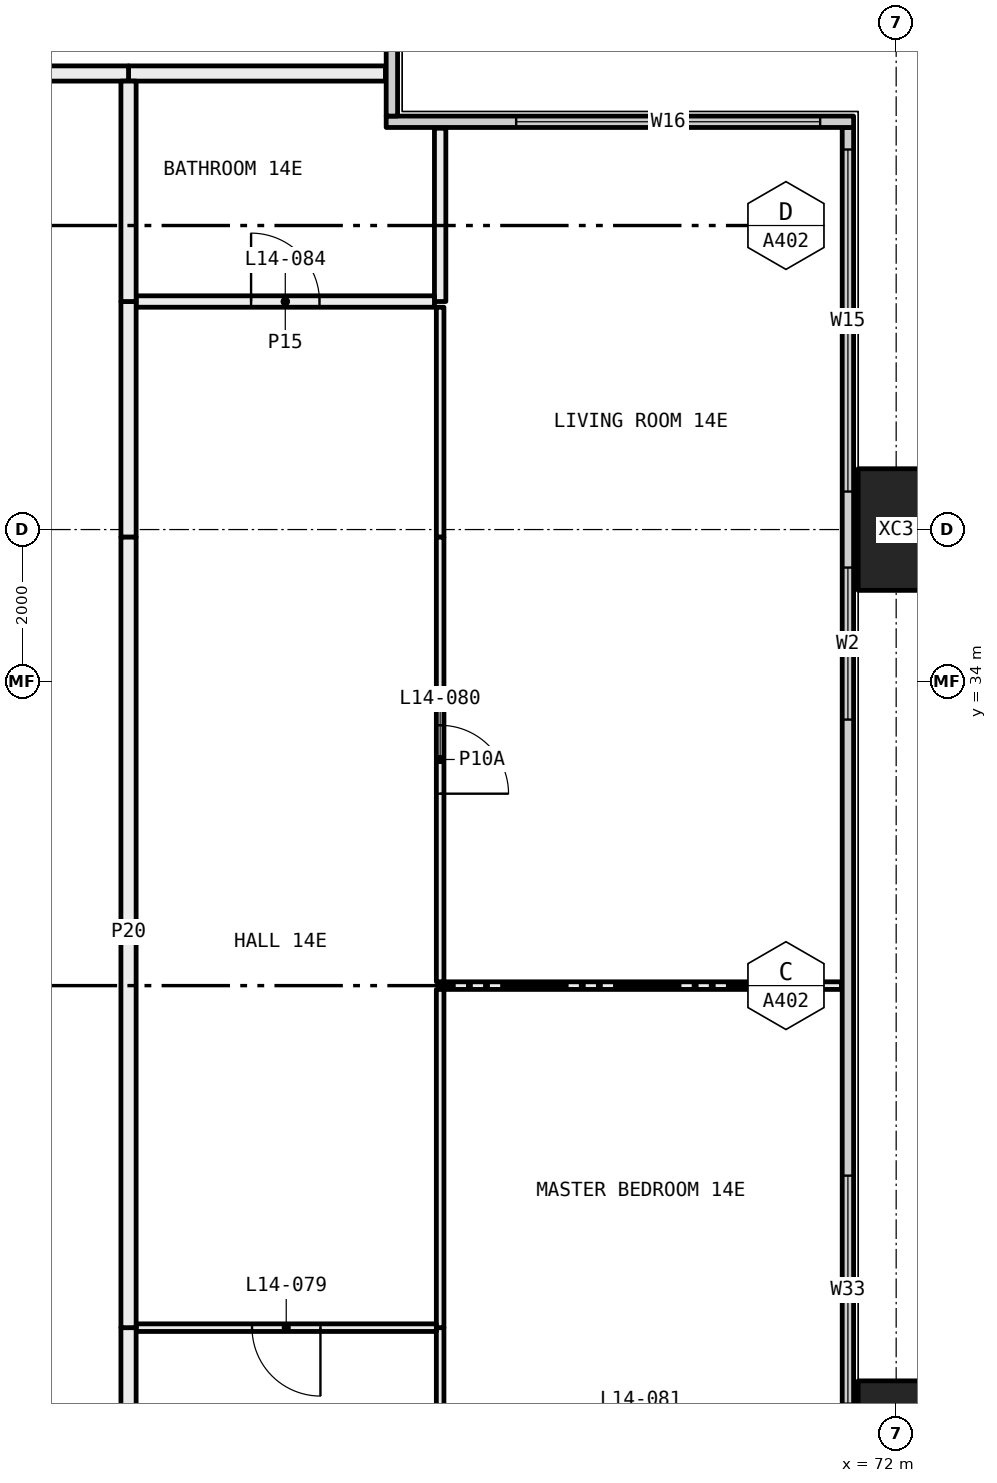
"""IFC4 building model, lengths in metres.
Left out: names, types, materials, properties, quantities, classifications, styles, units other than length and angle.
Written with IfcOpenShell. Run it as: python <this file> out.ifc"""

import sys

from ifc_helpers import new_model, si_unit, direction, frame, frame_2d, origin, origin_2d, place, context, subcontext, project, spatial, rectangle, hollow_rectangle, extrude, element, fill, save


model = new_model("IFC4")
c1 = context("Model", 3, precision=1e-05, world=origin(), true_north=direction((0.0, 1.0)))
c2 = subcontext(c1, "Body", "Model", "MODEL_VIEW")
j1 = project(units=[si_unit("LENGTHUNIT", "METRE"), si_unit("PLANEANGLEUNIT", "RADIAN")], contexts=[c1])
p1 = place(None, origin())
s1 = spatial("IfcSite", under=j1, at=p1, CompositionType="ELEMENT")
p2 = place(p1, origin())
s2 = spatial("IfcBuilding", under=s1, at=p2, CompositionType="ELEMENT")
p3 = place(p2, frame((0.0, 0.0, 61.05)))
s3 = spatial("IfcBuildingStorey", under=s2, at=p3, CompositionType="ELEMENT", Elevation=61.05)
for number, where, z_axis, x_axis in (
    (1, (72.0, 24.0, -0.4), (0.0, 0.0, 1.0), (0.0, 1.0, 0.0)),
    (2, (72.0, 36.0, -0.4), (0.0, 0.0, 1.0), (0.0, 1.0, 0.0)),
):
    element("IfcColumn", number, at=place(p3, frame(where, z_axis=z_axis, x_axis=x_axis)), inside=s3, PredefinedType="COLUMN", context=c2, shape_type="SweptSolid", body=[
        extrude(hollow_rectangle(XDim=1.6, YDim=1.0, WallThickness=0.065, at=origin_2d()), origin(), (0.0, 0.0, 1.0), 3.45),
    ])
p4 = place(p3, frame((71.365, 6.71, 0.0), z_axis=(0.0, 0.0, 1.0), x_axis=(0.0, 1.0, 0.0)))
e3 = element("IfcWall", 3, at=p4, inside=s3, PredefinedType="ELEMENTEDWALL", context=c2, shape_type="SweptSolid", body=[
    extrude(rectangle(XDim=34.58, YDim=0.15, at=frame_2d((17.29, 0.0))), origin(), (0.0, 0.0, 1.0), 3.05),
])
p5 = place(p4, frame((0.29, 0.0, 0.45)))
e4 = element("IfcOpeningElement", 4, at=p5, cuts=e3, PredefinedType="OPENING", context=c2, shape_type="SweptSolid", body=[
    extrude(rectangle(XDim=4.5, YDim=2.55, at=frame_2d((2.25, 1.275))), frame((0.0, 0.085, 0.0), z_axis=(0.0, -1.0, 0.0), x_axis=(1.0, 0.0, 0.0)), (0.0, 0.0, 1.0), 0.17),
])
p6 = place(p4, frame((5.79, 0.0, 0.45)))
e5 = element("IfcOpeningElement", 5, at=p6, cuts=e3, PredefinedType="OPENING", context=c2, shape_type="SweptSolid", body=[
    extrude(rectangle(XDim=3.0, YDim=2.55, at=frame_2d((1.5, 1.275))), frame((0.0, 0.085, 0.0), z_axis=(0.0, -1.0, 0.0), x_axis=(1.0, 0.0, 0.0)), (0.0, 0.0, 1.0), 0.17),
])
p7 = place(p4, frame((13.79, 0.0, 0.45)))
e6 = element("IfcOpeningElement", 6, at=p7, cuts=e3, PredefinedType="OPENING", context=c2, shape_type="SweptSolid", body=[
    extrude(rectangle(XDim=3.0, YDim=2.55, at=frame_2d((1.5, 1.275))), frame((0.0, 0.085, 0.0), z_axis=(0.0, -1.0, 0.0), x_axis=(1.0, 0.0, 0.0)), (0.0, 0.0, 1.0), 0.17),
])
p8 = place(p4, frame((17.79, 0.0, 0.45)))
e7 = element("IfcOpeningElement", 7, at=p8, cuts=e3, PredefinedType="OPENING", context=c2, shape_type="SweptSolid", body=[
    extrude(rectangle(XDim=3.0, YDim=2.55, at=frame_2d((1.5, 1.275))), frame((0.0, 0.085, 0.0), z_axis=(0.0, -1.0, 0.0), x_axis=(1.0, 0.0, 0.0)), (0.0, 0.0, 1.0), 0.17),
])
p9 = place(p4, frame((26.79, 0.0, 0.45)))
e8 = element("IfcOpeningElement", 8, at=p9, cuts=e3, PredefinedType="OPENING", context=c2, shape_type="SweptSolid", body=[
    extrude(rectangle(XDim=2.0, YDim=2.55, at=frame_2d((1.0, 1.275))), frame((0.0, 0.085, 0.0), z_axis=(0.0, -1.0, 0.0), x_axis=(1.0, 0.0, 0.0)), (0.0, 0.0, 1.0), 0.17),
])
p10 = place(p4, frame((29.79, 0.0, 0.45)))
e9 = element("IfcOpeningElement", 9, at=p10, cuts=e3, PredefinedType="OPENING", context=c2, shape_type="SweptSolid", body=[
    extrude(rectangle(XDim=4.5, YDim=2.55, at=frame_2d((2.25, 1.275))), frame((0.0, 0.085, 0.0), z_axis=(0.0, -1.0, 0.0), x_axis=(1.0, 0.0, 0.0)), (0.0, 0.0, 1.0), 0.17),
])
p11 = place(p3, frame((65.29, 41.365, 0.0), z_axis=(0.0, 0.0, 1.0), x_axis=(1.0, 0.0, 0.0)))
e10 = element("IfcWall", 10, at=p11, inside=s3, PredefinedType="ELEMENTEDWALL", context=c2, shape_type="SweptSolid", body=[
    extrude(rectangle(XDim=6.15, YDim=0.15, at=frame_2d((3.075, 0.0))), origin(), (0.0, 0.0, 1.0), 3.05),
])
p12 = place(p11, frame((1.71, 0.0, 0.45)))
e11 = element("IfcOpeningElement", 11, at=p12, cuts=e10, PredefinedType="OPENING", context=c2, shape_type="SweptSolid", body=[
    extrude(rectangle(XDim=4.0, YDim=2.55, at=frame_2d((2.0, 1.275))), frame((0.0, 0.085, 0.0), z_axis=(0.0, -1.0, 0.0), x_axis=(1.0, 0.0, 0.0)), (0.0, 0.0, 1.0), 0.17),
])
p13 = place(p3, frame((65.365, 41.44, 0.0), z_axis=(0.0, 0.0, 1.0), x_axis=(0.0, 1.0, 0.0)))
e12 = element("IfcWall", 12, at=p13, inside=s3, PredefinedType="ELEMENTEDWALL", context=c2, shape_type="SweptSolid", body=[
    extrude(rectangle(XDim=5.85, YDim=0.15, at=frame_2d((2.925, 0.0))), origin(), (0.0, 0.0, 1.0), 3.05),
])
p14 = place(p13, frame((1.56, 0.0, 0.45)))
e13 = element("IfcOpeningElement", 13, at=p14, cuts=e12, PredefinedType="OPENING", context=c2, shape_type="SweptSolid", body=[
    extrude(rectangle(XDim=4.0, YDim=2.55, at=frame_2d((2.0, 1.275))), frame((0.0, 0.085, 0.0), z_axis=(0.0, -1.0, 0.0), x_axis=(1.0, 0.0, 0.0)), (0.0, 0.0, 1.0), 0.17),
])
p15 = place(p3, frame((61.9, 42.0, 0.0), z_axis=(0.0, 0.0, 1.0), x_axis=(1.0, 0.0, 0.0)))
e14 = element("IfcWall", 14, at=p15, inside=s3, PredefinedType="PARTITIONING", context=c2, shape_type="SweptSolid", body=[
    extrude(rectangle(XDim=3.38, YDim=0.2, at=frame_2d((1.69, 0.0))), origin(), (0.0, 0.0, 1.0), 3.05),
])
p16 = place(p3, frame((54.0, 42.0, 0.0), z_axis=(0.0, 0.0, 1.0), x_axis=(1.0, 0.0, 0.0)))
e15 = element("IfcWall", 15, at=p16, inside=s3, PredefinedType="PARTITIONING", context=c2, shape_type="SweptSolid", body=[
    extrude(rectangle(XDim=7.9, YDim=0.2, at=frame_2d((3.95, 0.0))), origin(), (0.0, 0.0, 1.0), 3.05),
])
p17 = place(p3, frame((71.28, 30.0, 0.0), z_axis=(0.0, 0.0, 1.0), x_axis=(-1.0, 0.0, 0.0)))
e16 = element("IfcWall", 16, at=p17, inside=s3, PredefinedType="PARTITIONING", context=c2, shape_type="SweptSolid", body=[
    extrude(rectangle(XDim=5.28, YDim=0.1, at=frame_2d((2.64, 0.0))), origin(), (0.0, 0.0, 1.0), 3.05),
])
p18 = place(p3, frame((66.0, 25.5, 0.0), z_axis=(0.0, 0.0, 1.0), x_axis=(0.0, -1.0, 0.0)))
e17 = element("IfcWall", 17, at=p18, inside=s3, PredefinedType="PARTITIONING", context=c2, shape_type="SweptSolid", body=[
    extrude(rectangle(XDim=1.45, YDim=0.1, at=frame_2d((0.725, 0.0))), origin(), (0.0, 0.0, 1.0), 2.45),
])
p19 = place(p3, frame((66.0, 29.95, 0.0), z_axis=(0.0, 0.0, 1.0), x_axis=(0.0, -1.0, 0.0)))
e18 = element("IfcWall", 18, at=p19, inside=s3, PredefinedType="PARTITIONING", context=c2, shape_type="SweptSolid", body=[
    extrude(rectangle(XDim=4.45, YDim=0.1, at=frame_2d((2.225, 0.0))), origin(), (0.0, 0.0, 1.0), 3.05),
])
p20 = place(p3, frame((66.0, 38.925, 0.0), z_axis=(0.0, 0.0, 1.0), x_axis=(0.0, -1.0, 0.0)))
e19 = element("IfcWall", 19, at=p20, inside=s3, PredefinedType="PARTITIONING", context=c2, shape_type="SweptSolid", body=[
    extrude(rectangle(XDim=3.025, YDim=0.1, at=frame_2d((1.513, 0.0))), origin(), (0.0, 0.0, 1.0), 2.45),
])
p21 = place(p3, frame((66.0, 35.9, 0.0), z_axis=(0.0, 0.0, 1.0), x_axis=(0.0, -1.0, 0.0)))
e20 = element("IfcWall", 20, at=p21, inside=s3, PredefinedType="PARTITIONING", context=c2, shape_type="SweptSolid", body=[
    extrude(rectangle(XDim=5.85, YDim=0.1, at=frame_2d((2.925, 0.0))), origin(), (0.0, 0.0, 1.0), 3.05),
])
p22 = place(p21, frame((2.475, 0.0, 0.0)))
e21 = element("IfcOpeningElement", 21, at=p22, cuts=e20, PredefinedType="OPENING", context=c2, shape_type="SweptSolid", body=[
    extrude(rectangle(XDim=0.9, YDim=2.1, at=frame_2d((0.45, 1.05))), frame((0.0, 0.06, 0.0), z_axis=(0.0, -1.0, 0.0), x_axis=(1.0, 0.0, 0.0)), (0.0, 0.0, 1.0), 0.12),
])
p23 = place(p3, frame((66.0, 41.28, 0.0), z_axis=(0.0, 0.0, 1.0), x_axis=(0.0, -1.0, 0.0)))
e22 = element("IfcWall", 22, at=p23, inside=s3, PredefinedType="PARTITIONING", context=c2, shape_type="SweptSolid", body=[
    extrude(rectangle(XDim=2.28, YDim=0.15, at=frame_2d((1.14, 0.0))), origin(), (0.0, 0.0, 1.0), 3.05),
])
p24 = place(p3, frame((65.95, 25.5, 0.0), z_axis=(0.0, 0.0, 1.0), x_axis=(-1.0, 0.0, 0.0)))
e23 = element("IfcWall", 23, at=p24, inside=s3, PredefinedType="PARTITIONING", context=c2, shape_type="SweptSolid", body=[
    extrude(rectangle(XDim=3.95, YDim=0.1, at=frame_2d((1.975, 0.0))), origin(), (0.0, 0.0, 1.0), 3.05),
])
p25 = place(p24, frame((1.525, 0.0, 0.0)))
e24 = element("IfcOpeningElement", 24, at=p25, cuts=e23, PredefinedType="OPENING", context=c2, shape_type="SweptSolid", body=[
    extrude(rectangle(XDim=0.9, YDim=2.1, at=frame_2d((0.45, 1.05))), frame((0.0, 0.06, 0.0), z_axis=(0.0, -1.0, 0.0), x_axis=(1.0, 0.0, 0.0)), (0.0, 0.0, 1.0), 0.12),
])
p26 = place(p3, frame((61.9, 25.5, 0.0), z_axis=(0.0, 0.0, 1.0), x_axis=(0.0, -1.0, 0.0)))
e25 = element("IfcWall", 25, at=p26, inside=s3, PredefinedType="PARTITIONING", context=c2, shape_type="SweptSolid", body=[
    extrude(rectangle(XDim=1.6, YDim=0.2, at=frame_2d((0.8, 0.0))), origin(), (0.0, 0.0, 1.0), 2.45),
])
p27 = place(p3, frame((65.925, 39.0, 0.0), z_axis=(0.0, 0.0, 1.0), x_axis=(-1.0, 0.0, 0.0)))
e26 = element("IfcWall", 26, at=p27, inside=s3, PredefinedType="PARTITIONING", context=c2, shape_type="SweptSolid", body=[
    extrude(rectangle(XDim=3.925, YDim=0.15, at=frame_2d((1.962, 0.0))), origin(), (0.0, 0.0, 1.0), 3.05),
])
p28 = place(p27, frame((1.512, 0.0, 0.0)))
e27 = element("IfcOpeningElement", 27, at=p28, cuts=e26, PredefinedType="OPENING", context=c2, shape_type="SweptSolid", body=[
    extrude(rectangle(XDim=0.9, YDim=2.1, at=frame_2d((0.45, 1.05))), frame((0.0, 0.085, 0.0), z_axis=(0.0, -1.0, 0.0), x_axis=(1.0, 0.0, 0.0)), (0.0, 0.0, 1.0), 0.17),
])
p29 = place(p3, frame((61.9, 39.0, 0.0), z_axis=(0.0, 0.0, 1.0), x_axis=(0.0, -1.0, 0.0)))
e28 = element("IfcWall", 28, at=p29, inside=s3, PredefinedType="PARTITIONING", context=c2, shape_type="SweptSolid", body=[
    extrude(rectangle(XDim=3.1, YDim=0.2, at=frame_2d((1.55, 0.0))), origin(), (0.0, 0.0, 1.0), 2.45),
])
p30 = place(p3, frame((61.9, 35.9, 0.0), z_axis=(0.0, 0.0, 1.0), x_axis=(0.0, -1.0, 0.0)))
e29 = element("IfcWall", 29, at=p30, inside=s3, PredefinedType="PARTITIONING", context=c2, shape_type="SweptSolid", body=[
    extrude(rectangle(XDim=10.4, YDim=0.2, at=frame_2d((5.2, 0.0))), origin(), (0.0, 0.0, 1.0), 3.05),
])
p31 = place(p3, frame((61.9, 41.9, 0.0), z_axis=(0.0, 0.0, 1.0), x_axis=(0.0, -1.0, 0.0)))
e30 = element("IfcWall", 30, at=p31, inside=s3, PredefinedType="PARTITIONING", context=c2, shape_type="SweptSolid", body=[
    extrude(rectangle(XDim=2.9, YDim=0.2, at=frame_2d((1.45, 0.0))), origin(), (0.0, 0.0, 1.0), 3.05),
])
p32 = place(p8, origin())
e31 = element("IfcWindow", 31, at=p32, inside=s3, PartitioningType="SINGLE_PANEL", PredefinedType="WINDOW", context=c2, shape_type="SweptSolid", body=[
    extrude(rectangle(XDim=3.0, YDim=2.55, at=frame_2d((1.5, 1.275))), frame((0.0, 0.03, 0.0), z_axis=(0.0, -1.0, 0.0), x_axis=(1.0, 0.0, 0.0)), (0.0, 0.0, 1.0), 0.06),
])
fill(e7, e31)
p33 = place(p9, origin())
e32 = element("IfcWindow", 32, at=p33, inside=s3, PartitioningType="SINGLE_PANEL", PredefinedType="WINDOW", context=c2, shape_type="SweptSolid", body=[
    extrude(rectangle(XDim=2.0, YDim=2.55, at=frame_2d((1.0, 1.275))), frame((0.0, 0.03, 0.0), z_axis=(0.0, -1.0, 0.0), x_axis=(1.0, 0.0, 0.0)), (0.0, 0.0, 1.0), 0.06),
])
fill(e8, e32)
p34 = place(p10, origin())
e33 = element("IfcWindow", 33, at=p34, inside=s3, PartitioningType="SINGLE_PANEL", PredefinedType="WINDOW", context=c2, shape_type="SweptSolid", body=[
    extrude(rectangle(XDim=4.5, YDim=2.55, at=frame_2d((2.25, 1.275))), frame((0.0, 0.03, 0.0), z_axis=(0.0, -1.0, 0.0), x_axis=(1.0, 0.0, 0.0)), (0.0, 0.0, 1.0), 0.06),
])
fill(e9, e33)
p35 = place(p12, origin())
e34 = element("IfcWindow", 34, at=p35, inside=s3, PartitioningType="SINGLE_PANEL", PredefinedType="WINDOW", context=c2, shape_type="SweptSolid", body=[
    extrude(rectangle(XDim=4.0, YDim=2.55, at=frame_2d((2.0, 1.275))), frame((0.0, 0.03, 0.0), z_axis=(0.0, -1.0, 0.0), x_axis=(1.0, 0.0, 0.0)), (0.0, 0.0, 1.0), 0.06),
])
fill(e11, e34)
p36 = place(p25, origin())
e35 = element("IfcDoor", 35, at=p36, inside=s3, OperationType="SINGLE_SWING_RIGHT", PredefinedType="DOOR", context=c2, shape_type="SweptSolid", body=[
    extrude(rectangle(XDim=0.9, YDim=2.1, at=frame_2d((0.45, 1.05))), frame((0.0, 0.025, 0.0), z_axis=(0.0, -1.0, 0.0), x_axis=(1.0, 0.0, 0.0)), (0.0, 0.0, 1.0), 0.05),
])
fill(e24, e35)
p37 = place(p22, origin())
e36 = element("IfcDoor", 36, at=p37, inside=s3, OperationType="SINGLE_SWING_LEFT", PredefinedType="DOOR", context=c2, shape_type="SweptSolid", body=[
    extrude(rectangle(XDim=0.9, YDim=2.1, at=frame_2d((0.45, 1.05))), frame((0.0, 0.025, 0.0), z_axis=(0.0, -1.0, 0.0), x_axis=(1.0, 0.0, 0.0)), (0.0, 0.0, 1.0), 0.05),
])
fill(e21, e36)
p38 = place(p28, frame((0.9, 0.0, 0.0), x_axis=(-1.0, 0.0, 0.0)))
e37 = element("IfcDoor", 37, at=p38, inside=s3, OperationType="SINGLE_SWING_RIGHT", PredefinedType="DOOR", context=c2, shape_type="SweptSolid", body=[
    extrude(rectangle(XDim=0.9, YDim=2.1, at=frame_2d((0.45, 1.05))), frame((0.0, 0.025, 0.0), z_axis=(0.0, -1.0, 0.0), x_axis=(1.0, 0.0, 0.0)), (0.0, 0.0, 1.0), 0.05),
])
fill(e27, e37)
save(model, sys.argv[1])
